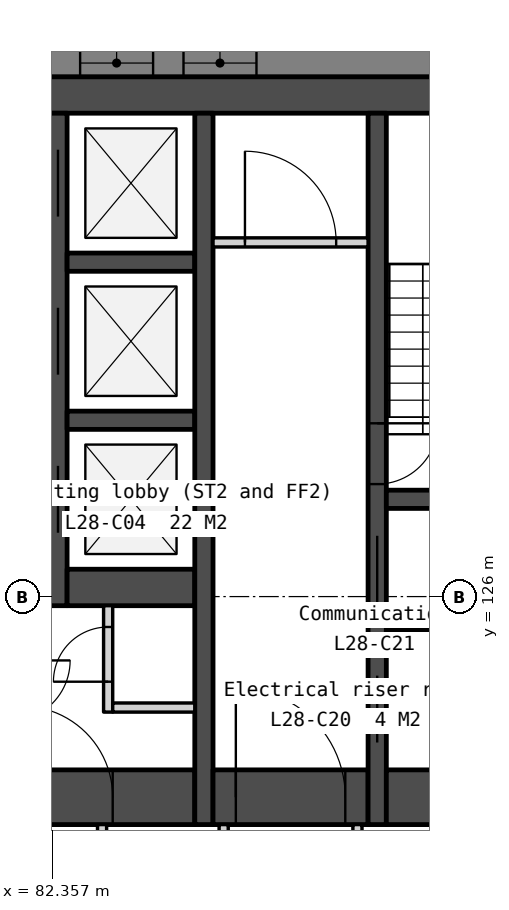
"""IFC4 building model, lengths in metres.
Left out: names, types, materials, properties, quantities, classifications, styles, units other than length and angle.
Written with IfcOpenShell. Run it as: python <this file> out.ifc"""

import sys

from ifc_helpers import new_model, si_unit, direction, frame, frame_2d, origin, place, context, subcontext, project, spatial, polyline, rectangle, outline, extrude, element, fill, save


model = new_model("IFC4")
c1 = context("Model", 3, precision=1e-05, world=origin(), true_north=direction((0.0, 1.0)))
c2 = subcontext(c1, "Body", "Model", "MODEL_VIEW")
j1 = project(units=[si_unit("LENGTHUNIT", "METRE"), si_unit("PLANEANGLEUNIT", "RADIAN")], contexts=[c1])
p1 = place(None, origin())
s1 = spatial("IfcSite", under=j1, at=p1, CompositionType="ELEMENT")
p2 = place(p1, origin())
s2 = spatial("IfcBuilding", under=s1, at=p2, CompositionType="ELEMENT")
p3 = place(p2, frame((0.0, 0.0, 113.3)))
s3 = spatial("IfcBuildingStorey", under=s2, at=p3, CompositionType="ELEMENT", Elevation=113.3)
p4 = place(p3, frame((66.0, 134.25, 0.0), z_axis=(0.0, 0.0, 1.0), x_axis=(1.0, 0.0, 0.0)))
e1 = element("IfcWall", 1, at=p4, inside=s3, PredefinedType="SOLIDWALL", context=c2, shape_type="SweptSolid", body=[
    extrude(rectangle(XDim=28.0, YDim=0.6, at=frame_2d((14.0, 0.0))), origin(), (0.0, 0.0, 1.0), 3.35),
])
p5 = place(p3, frame((81.8, 122.7, 0.0), z_axis=(0.0, 0.0, 1.0), x_axis=(1.0, 0.0, 0.0)))
e2 = element("IfcWall", 2, at=p5, inside=s3, PredefinedType="SOLIDWALL", context=c2, shape_type="SweptSolid", body=[
    extrude(rectangle(XDim=2.9, YDim=0.9, at=frame_2d((1.45, 0.0))), origin(), (0.0, 0.0, 1.0), 3.35),
])
p6 = place(p5, frame((0.05, 0.0, 0.0)))
e3 = element("IfcOpeningElement", 3, at=p6, cuts=e2, PredefinedType="OPENING", context=c2, shape_type="SweptSolid", body=[
    extrude(rectangle(XDim=1.5, YDim=2.1, at=frame_2d((0.75, 1.05))), frame((0.0, 0.46, 0.0), z_axis=(0.0, -1.0, 0.0), x_axis=(1.0, 0.0, 0.0)), (0.0, 0.0, 1.0), 0.92),
])
p7 = place(p3, frame((82.45, 133.95, 0.0), z_axis=(0.0, 0.0, 1.0), x_axis=(0.0, -1.0, 0.0)))
e4 = element("IfcWall", 4, at=p7, inside=s3, PredefinedType="SOLIDWALL", context=c2, shape_type="SweptSolid", body=[
    extrude(rectangle(XDim=8.1, YDim=0.3, at=frame_2d((4.05, 0.0))), origin(), (0.0, 0.0, 1.0), 3.35),
])
p8 = place(p7, frame((0.6, 0.0, 0.0)))
e5 = element("IfcOpeningElement", 5, at=p8, cuts=e4, PredefinedType="OPENING", context=c2, shape_type="SweptSolid", body=[
    extrude(rectangle(XDim=1.1, YDim=2.1, at=frame_2d((0.55, 1.05))), frame((0.0, 0.16, 0.0), z_axis=(0.0, -1.0, 0.0), x_axis=(1.0, 0.0, 0.0)), (0.0, 0.0, 1.0), 0.32),
])
p9 = place(p7, frame((3.2, 0.0, 0.0)))
e6 = element("IfcOpeningElement", 6, at=p9, cuts=e4, PredefinedType="OPENING", context=c2, shape_type="SweptSolid", body=[
    extrude(rectangle(XDim=1.1, YDim=2.1, at=frame_2d((0.55, 1.05))), frame((0.0, 0.16, 0.0), z_axis=(0.0, -1.0, 0.0), x_axis=(1.0, 0.0, 0.0)), (0.0, 0.0, 1.0), 0.32),
])
p10 = place(p7, frame((5.8, 0.0, 0.0)))
e7 = element("IfcOpeningElement", 7, at=p10, cuts=e4, PredefinedType="OPENING", context=c2, shape_type="SweptSolid", body=[
    extrude(rectangle(XDim=1.1, YDim=2.1, at=frame_2d((0.55, 1.05))), frame((0.0, 0.16, 0.0), z_axis=(0.0, -1.0, 0.0), x_axis=(1.0, 0.0, 0.0)), (0.0, 0.0, 1.0), 0.32),
])
for number, where, z_axis, x_axis in (
    (8, (82.6, 131.5, 0.0), (0.0, 0.0, 1.0), (1.0, 0.0, 0.0)),
    (9, (82.6, 128.9, 0.0), (0.0, 0.0, 1.0), (1.0, 0.0, 0.0)),
):
    element("IfcWall", number, at=place(p3, frame(where, z_axis=z_axis, x_axis=x_axis)), inside=s3, PredefinedType="SOLIDWALL", context=c2, shape_type="SweptSolid", body=[
        extrude(rectangle(XDim=2.1, YDim=0.3, at=frame_2d((1.05, 0.0))), origin(), (0.0, 0.0, 1.0), 3.35),
    ])
p11 = place(p3, frame((82.6, 126.15, 0.0), z_axis=(0.0, 0.0, 1.0), x_axis=(1.0, 0.0, 0.0)))
e10 = element("IfcWall", 10, at=p11, inside=s3, PredefinedType="SOLIDWALL", context=c2, shape_type="SweptSolid", body=[
    extrude(rectangle(XDim=2.1, YDim=0.6, at=frame_2d((1.05, 0.0))), origin(), (0.0, 0.0, 1.0), 3.35),
])
p12 = place(p3, frame((83.175, 122.25, 0.0), z_axis=(0.0, 0.0, 1.0), x_axis=(0.0, -1.0, 0.0)))
e11 = element("IfcWall", 11, at=p12, inside=s3, PredefinedType="PARTITIONING", context=c2, shape_type="SweptSolid", body=[
    extrude(rectangle(XDim=2.1, YDim=0.15, at=frame_2d((1.05, 0.0))), origin(), (0.0, 0.0, 1.0), 3.35),
])
p13 = place(p3, frame((83.275, 125.85, 0.0), z_axis=(0.0, 0.0, 1.0), x_axis=(0.0, -1.0, 0.0)))
e12 = element("IfcWall", 12, at=p13, inside=s3, PredefinedType="PARTITIONING", context=c2, shape_type="SweptSolid", body=[
    extrude(rectangle(XDim=1.75, YDim=0.15, at=frame_2d((0.875, 0.0))), origin(), (0.0, 0.0, 1.0), 3.35),
])
p14 = place(p13, frame((0.35, 0.0, 0.0)))
e13 = element("IfcOpeningElement", 13, at=p14, cuts=e12, PredefinedType="OPENING", context=c2, shape_type="SweptSolid", body=[
    extrude(rectangle(XDim=0.9, YDim=2.1, at=frame_2d((0.45, 1.05))), frame((0.0, 0.085, 0.0), z_axis=(0.0, -1.0, 0.0), x_axis=(1.0, 0.0, 0.0)), (0.0, 0.0, 1.0), 0.17),
])
p15 = place(p3, frame((83.35, 124.175, 0.0), z_axis=(0.0, 0.0, 1.0), x_axis=(1.0, 0.0, 0.0)))
e14 = element("IfcWall", 14, at=p15, inside=s3, PredefinedType="PARTITIONING", context=c2, shape_type="SweptSolid", body=[
    extrude(rectangle(XDim=1.35, YDim=0.15, at=frame_2d((0.675, 0.0))), origin(), (0.0, 0.0, 1.0), 3.35),
])
p16 = place(p3, frame((84.85, 133.95, 0.0), z_axis=(0.0, 0.0, 1.0), x_axis=(0.0, -1.0, 0.0)))
e15 = element("IfcWall", 15, at=p16, inside=s3, PredefinedType="SOLIDWALL", context=c2, shape_type="SweptSolid", body=[
    extrude(rectangle(XDim=11.7, YDim=0.3, at=frame_2d((5.85, 0.0))), origin(), (0.0, 0.0, 1.0), 3.35),
])
p17 = place(p3, frame((85.0, 131.825, 0.0), z_axis=(0.0, 0.0, 1.0), x_axis=(1.0, 0.0, 0.0)))
e16 = element("IfcWall", 16, at=p17, inside=s3, PredefinedType="PARTITIONING", context=c2, shape_type="SweptSolid", body=[
    extrude(rectangle(XDim=2.55, YDim=0.15, at=frame_2d((1.275, 0.0))), origin(), (0.0, 0.0, 1.0), 3.35),
])
p18 = place(p17, frame((0.525, 0.0, 0.0)))
e17 = element("IfcOpeningElement", 17, at=p18, cuts=e16, PredefinedType="OPENING", context=c2, shape_type="SweptSolid", body=[
    extrude(rectangle(XDim=1.5, YDim=2.1, at=frame_2d((0.75, 1.05))), frame((0.0, 0.085, 0.0), z_axis=(0.0, -1.0, 0.0), x_axis=(1.0, 0.0, 0.0)), (0.0, 0.0, 1.0), 0.17),
])
p19 = place(p3, frame((85.0, 122.7, 0.0), z_axis=(0.0, 0.0, 1.0), x_axis=(1.0, 0.0, 0.0)))
e18 = element("IfcWall", 18, at=p19, inside=s3, PredefinedType="SOLIDWALL", context=c2, shape_type="SweptSolid", body=[
    extrude(rectangle(XDim=2.55, YDim=0.9, at=frame_2d((1.275, 0.0))), origin(), (0.0, 0.0, 1.0), 3.35),
])
p20 = place(p19, frame((0.375, 0.0, 0.0)))
e19 = element("IfcOpeningElement", 19, at=p20, cuts=e18, PredefinedType="OPENING", context=c2, shape_type="SweptSolid", body=[
    extrude(rectangle(XDim=1.8, YDim=2.1, at=frame_2d((0.9, 1.05))), frame((0.0, 0.46, 0.0), z_axis=(0.0, -1.0, 0.0), x_axis=(1.0, 0.0, 0.0)), (0.0, 0.0, 1.0), 0.92),
])
p21 = place(p3, frame((85.175, 122.25, 0.0), z_axis=(0.0, 0.0, 1.0), x_axis=(0.0, -1.0, 0.0)))
e20 = element("IfcWall", 20, at=p21, inside=s3, PredefinedType="PARTITIONING", context=c2, shape_type="SweptSolid", body=[
    extrude(rectangle(XDim=2.1, YDim=0.15, at=frame_2d((1.05, 0.0))), origin(), (0.0, 0.0, 1.0), 3.35),
])
p22 = place(p21, frame((0.55, 0.0, 0.0)))
e21 = element("IfcOpeningElement", 21, at=p22, cuts=e20, PredefinedType="OPENING", context=c2, shape_type="SweptSolid", body=[
    extrude(rectangle(XDim=1.0, YDim=2.1, at=frame_2d((0.5, 1.05))), frame((0.0, 0.085, 0.0), z_axis=(0.0, -1.0, 0.0), x_axis=(1.0, 0.0, 0.0)), (0.0, 0.0, 1.0), 0.17),
])
p23 = place(p3, frame((87.375, 122.25, 0.0), z_axis=(0.0, 0.0, 1.0), x_axis=(0.0, -1.0, 0.0)))
e22 = element("IfcWall", 22, at=p23, inside=s3, PredefinedType="PARTITIONING", context=c2, shape_type="SweptSolid", body=[
    extrude(rectangle(XDim=2.1, YDim=0.15, at=frame_2d((1.05, 0.0))), origin(), (0.0, 0.0, 1.0), 3.35),
])
p24 = place(p3, frame((87.7, 133.95, 0.0), z_axis=(0.0, 0.0, 1.0), x_axis=(0.0, -1.0, 0.0)))
e23 = element("IfcWall", 23, at=p24, inside=s3, PredefinedType="SOLIDWALL", context=c2, shape_type="SweptSolid", body=[
    extrude(rectangle(XDim=11.7, YDim=0.3, at=frame_2d((5.85, 0.0))), origin(), (0.0, 0.0, 1.0), 3.35),
])
p25 = place(p24, frame((6.95, 0.0, 0.0)))
e24 = element("IfcOpeningElement", 24, at=p25, cuts=e23, PredefinedType="OPENING", context=c2, shape_type="SweptSolid", body=[
    extrude(rectangle(XDim=1.1, YDim=2.1, at=frame_2d((0.55, 1.05))), frame((0.0, 0.16, 0.0), z_axis=(0.0, -1.0, 0.0), x_axis=(1.0, 0.0, 0.0)), (0.0, 0.0, 1.0), 0.32),
])
p26 = place(p24, frame((5.1, 0.0, 0.0)))
e25 = element("IfcOpeningElement", 25, at=p26, cuts=e23, PredefinedType="OPENING", context=c2, shape_type="SweptSolid", body=[
    extrude(rectangle(XDim=1.0, YDim=2.1, at=frame_2d((0.5, 1.05))), frame((0.0, 0.16, 0.0), z_axis=(0.0, -1.0, 0.0), x_axis=(1.0, 0.0, 0.0)), (0.0, 0.0, 1.0), 0.32),
])
p27 = place(p24, frame((9.25, 0.0, 0.0)))
e26 = element("IfcOpeningElement", 26, at=p27, cuts=e23, PredefinedType="OPENING", context=c2, shape_type="SweptSolid", body=[
    extrude(rectangle(XDim=1.1, YDim=2.1, at=frame_2d((0.55, 1.05))), frame((0.0, 0.16, 0.0), z_axis=(0.0, -1.0, 0.0), x_axis=(1.0, 0.0, 0.0)), (0.0, 0.0, 1.0), 0.32),
])
for number, where, z_axis, x_axis in (
    (27, (87.85, 127.6, 0.0), (0.0, 0.0, 1.0), (1.0, 0.0, 0.0)),
    (28, (87.85, 125.3, 0.0), (0.0, 0.0, 1.0), (1.0, 0.0, 0.0)),
):
    element("IfcWall", number, at=place(p3, frame(where, z_axis=z_axis, x_axis=x_axis)), inside=s3, PredefinedType="SOLIDWALL", context=c2, shape_type="SweptSolid", body=[
        extrude(rectangle(XDim=2.55, YDim=0.3, at=frame_2d((1.275, 0.0))), origin(), (0.0, 0.0, 1.0), 3.35),
    ])
p28 = place(p3, frame((87.85, 122.7, 0.0), z_axis=(0.0, 0.0, 1.0), x_axis=(1.0, 0.0, 0.0)))
e29 = element("IfcWall", 29, at=p28, inside=s3, PredefinedType="SOLIDWALL", context=c2, shape_type="SweptSolid", body=[
    extrude(rectangle(XDim=2.55, YDim=0.9, at=frame_2d((1.275, 0.0))), origin(), (0.0, 0.0, 1.0), 3.35),
])
p29 = place(p3, frame((101.322, 134.775, -0.15), z_axis=(0.0, 0.0, 1.0), x_axis=(-1.0, 0.0, 0.0)))
e30 = element("IfcWall", 30, at=p29, inside=s3, PredefinedType="SOLIDWALL", context=c2, shape_type="SweptSolid", body=[
    extrude(outline(polyline([(42.643, 0.0), (42.643, 3.5), (0.0, 3.5), (0.0, 0.0), (42.643, 0.0)])), frame((0.0, 0.225, 0.0), z_axis=(0.0, -1.0, 0.0), x_axis=(1.0, 0.0, 0.0)), (0.0, 0.0, 1.0), 0.45),
])
p30 = place(p29, frame((7.079, 0.0, 1.05)))
e31 = element("IfcOpeningElement", 31, at=p30, cuts=e30, PredefinedType="OPENING", context=c2, shape_type="SweptSolid", body=[
    extrude(rectangle(XDim=1.2, YDim=1.5, at=frame_2d((0.6, 0.75))), frame((0.0, 0.235, 0.0), z_axis=(0.0, -1.0, 0.0), x_axis=(1.0, 0.0, 0.0)), (0.0, 0.0, 1.0), 0.47),
])
p31 = place(p29, frame((8.779, 0.0, 1.05)))
e32 = element("IfcOpeningElement", 32, at=p31, cuts=e30, PredefinedType="OPENING", context=c2, shape_type="SweptSolid", body=[
    extrude(rectangle(XDim=1.2, YDim=1.5, at=frame_2d((0.6, 0.75))), frame((0.0, 0.235, 0.0), z_axis=(0.0, -1.0, 0.0), x_axis=(1.0, 0.0, 0.0)), (0.0, 0.0, 1.0), 0.47),
])
p32 = place(p29, frame((15.607, 0.0, 1.05)))
e33 = element("IfcOpeningElement", 33, at=p32, cuts=e30, PredefinedType="OPENING", context=c2, shape_type="SweptSolid", body=[
    extrude(rectangle(XDim=1.2, YDim=1.5, at=frame_2d((0.6, 0.75))), frame((0.0, 0.235, 0.0), z_axis=(0.0, -1.0, 0.0), x_axis=(1.0, 0.0, 0.0)), (0.0, 0.0, 1.0), 0.47),
])
p33 = place(p29, frame((17.307, 0.0, 1.05)))
e34 = element("IfcOpeningElement", 34, at=p33, cuts=e30, PredefinedType="OPENING", context=c2, shape_type="SweptSolid", body=[
    extrude(rectangle(XDim=1.2, YDim=1.5, at=frame_2d((0.6, 0.75))), frame((0.0, 0.235, 0.0), z_axis=(0.0, -1.0, 0.0), x_axis=(1.0, 0.0, 0.0)), (0.0, 0.0, 1.0), 0.47),
])
p34 = place(p29, frame((24.136, 0.0, 1.05)))
e35 = element("IfcOpeningElement", 35, at=p34, cuts=e30, PredefinedType="OPENING", context=c2, shape_type="SweptSolid", body=[
    extrude(rectangle(XDim=1.2, YDim=1.5, at=frame_2d((0.6, 0.75))), frame((0.0, 0.235, 0.0), z_axis=(0.0, -1.0, 0.0), x_axis=(1.0, 0.0, 0.0)), (0.0, 0.0, 1.0), 0.47),
])
p35 = place(p29, frame((25.836, 0.0, 1.05)))
e36 = element("IfcOpeningElement", 36, at=p35, cuts=e30, PredefinedType="OPENING", context=c2, shape_type="SweptSolid", body=[
    extrude(rectangle(XDim=1.2, YDim=1.5, at=frame_2d((0.6, 0.75))), frame((0.0, 0.235, 0.0), z_axis=(0.0, -1.0, 0.0), x_axis=(1.0, 0.0, 0.0)), (0.0, 0.0, 1.0), 0.47),
])
p36 = place(p29, frame((32.665, 0.0, 1.05)))
e37 = element("IfcOpeningElement", 37, at=p36, cuts=e30, PredefinedType="OPENING", context=c2, shape_type="SweptSolid", body=[
    extrude(rectangle(XDim=1.2, YDim=1.5, at=frame_2d((0.6, 0.75))), frame((0.0, 0.235, 0.0), z_axis=(0.0, -1.0, 0.0), x_axis=(1.0, 0.0, 0.0)), (0.0, 0.0, 1.0), 0.47),
])
p37 = place(p29, frame((34.365, 0.0, 1.05)))
e38 = element("IfcOpeningElement", 38, at=p37, cuts=e30, PredefinedType="OPENING", context=c2, shape_type="SweptSolid", body=[
    extrude(rectangle(XDim=1.2, YDim=1.5, at=frame_2d((0.6, 0.75))), frame((0.0, 0.235, 0.0), z_axis=(0.0, -1.0, 0.0), x_axis=(1.0, 0.0, 0.0)), (0.0, 0.0, 1.0), 0.47),
])
p38 = place(p8, origin())
e39 = element("IfcDoor", 39, at=p38, inside=s3, OperationType="SLIDING_TO_LEFT", PredefinedType="DOOR", context=c2, shape_type="SweptSolid", body=[
    extrude(rectangle(XDim=1.1, YDim=2.1, at=frame_2d((0.55, 1.05))), frame((0.0, 0.025, 0.0), z_axis=(0.0, -1.0, 0.0), x_axis=(1.0, 0.0, 0.0)), (0.0, 0.0, 1.0), 0.05),
])
fill(e5, e39)
p39 = place(p9, origin())
e40 = element("IfcDoor", 40, at=p39, inside=s3, OperationType="SLIDING_TO_LEFT", PredefinedType="DOOR", context=c2, shape_type="SweptSolid", body=[
    extrude(rectangle(XDim=1.1, YDim=2.1, at=frame_2d((0.55, 1.05))), frame((0.0, 0.025, 0.0), z_axis=(0.0, -1.0, 0.0), x_axis=(1.0, 0.0, 0.0)), (0.0, 0.0, 1.0), 0.05),
])
fill(e6, e40)
p40 = place(p10, origin())
e41 = element("IfcDoor", 41, at=p40, inside=s3, OperationType="SLIDING_TO_LEFT", PredefinedType="DOOR", context=c2, shape_type="SweptSolid", body=[
    extrude(rectangle(XDim=1.1, YDim=2.1, at=frame_2d((0.55, 1.05))), frame((0.0, 0.025, 0.0), z_axis=(0.0, -1.0, 0.0), x_axis=(1.0, 0.0, 0.0)), (0.0, 0.0, 1.0), 0.05),
])
fill(e7, e41)
p41 = place(p25, origin())
e42 = element("IfcDoor", 42, at=p41, inside=s3, OperationType="SLIDING_TO_LEFT", PredefinedType="DOOR", context=c2, shape_type="SweptSolid", body=[
    extrude(rectangle(XDim=1.1, YDim=2.1, at=frame_2d((0.55, 1.05))), frame((0.0, 0.025, 0.0), z_axis=(0.0, -1.0, 0.0), x_axis=(1.0, 0.0, 0.0)), (0.0, 0.0, 1.0), 0.05),
])
fill(e24, e42)
p42 = place(p20, origin())
e43 = element("IfcDoor", 43, at=p42, inside=s3, OperationType="DOUBLE_DOOR_DOUBLE_SWING", PredefinedType="DOOR", context=c2, shape_type="SweptSolid", body=[
    extrude(rectangle(XDim=1.8, YDim=2.1, at=frame_2d((0.9, 1.05))), frame((0.0, 0.025, 0.0), z_axis=(0.0, -1.0, 0.0), x_axis=(1.0, 0.0, 0.0)), (0.0, 0.0, 1.0), 0.05),
])
fill(e19, e43)
p43 = place(p6, origin())
e44 = element("IfcDoor", 44, at=p43, inside=s3, OperationType="DOUBLE_DOOR_DOUBLE_SWING", PredefinedType="DOOR", context=c2, shape_type="SweptSolid", body=[
    extrude(rectangle(XDim=1.5, YDim=2.1, at=frame_2d((0.75, 1.05))), frame((0.0, 0.025, 0.0), z_axis=(0.0, -1.0, 0.0), x_axis=(1.0, 0.0, 0.0)), (0.0, 0.0, 1.0), 0.05),
])
fill(e3, e44)
p44 = place(p14, origin())
e45 = element("IfcDoor", 45, at=p44, inside=s3, OperationType="SINGLE_SWING_RIGHT", PredefinedType="DOOR", context=c2, shape_type="SweptSolid", body=[
    extrude(rectangle(XDim=0.9, YDim=2.1, at=frame_2d((0.45, 1.05))), frame((0.0, 0.025, 0.0), z_axis=(0.0, -1.0, 0.0), x_axis=(1.0, 0.0, 0.0)), (0.0, 0.0, 1.0), 0.05),
])
fill(e13, e45)
p45 = place(p18, origin())
e46 = element("IfcDoor", 46, at=p45, inside=s3, OperationType="DOUBLE_DOOR_DOUBLE_SWING", PredefinedType="DOOR", context=c2, shape_type="SweptSolid", body=[
    extrude(rectangle(XDim=1.5, YDim=2.1, at=frame_2d((0.75, 1.05))), frame((0.0, 0.025, 0.0), z_axis=(0.0, -1.0, 0.0), x_axis=(1.0, 0.0, 0.0)), (0.0, 0.0, 1.0), 0.05),
])
fill(e17, e46)
p46 = place(p26, origin())
e47 = element("IfcDoor", 47, at=p46, inside=s3, OperationType="SINGLE_SWING_LEFT", PredefinedType="DOOR", context=c2, shape_type="SweptSolid", body=[
    extrude(rectangle(XDim=1.0, YDim=2.1, at=frame_2d((0.5, 1.05))), frame((0.0, 0.025, 0.0), z_axis=(0.0, -1.0, 0.0), x_axis=(1.0, 0.0, 0.0)), (0.0, 0.0, 1.0), 0.05),
])
fill(e25, e47)
p47 = place(p27, origin())
e48 = element("IfcDoor", 48, at=p47, inside=s3, OperationType="SLIDING_TO_LEFT", PredefinedType="DOOR", context=c2, shape_type="SweptSolid", body=[
    extrude(rectangle(XDim=1.1, YDim=2.1, at=frame_2d((0.55, 1.05))), frame((0.0, 0.025, 0.0), z_axis=(0.0, -1.0, 0.0), x_axis=(1.0, 0.0, 0.0)), (0.0, 0.0, 1.0), 0.05),
])
fill(e26, e48)
p48 = place(p32, origin())
e49 = element("IfcWindow", 49, at=p48, inside=s3, PartitioningType="SINGLE_PANEL", PredefinedType="WINDOW", context=c2, shape_type="SweptSolid", body=[
    extrude(rectangle(XDim=1.2, YDim=1.5, at=frame_2d((0.6, 0.75))), frame((0.0, 0.03, 0.0), z_axis=(0.0, -1.0, 0.0), x_axis=(1.0, 0.0, 0.0)), (0.0, 0.0, 1.0), 0.06),
])
fill(e33, e49)
p49 = place(p33, origin())
e50 = element("IfcWindow", 50, at=p49, inside=s3, PartitioningType="SINGLE_PANEL", PredefinedType="WINDOW", context=c2, shape_type="SweptSolid", body=[
    extrude(rectangle(XDim=1.2, YDim=1.5, at=frame_2d((0.6, 0.75))), frame((0.0, 0.03, 0.0), z_axis=(0.0, -1.0, 0.0), x_axis=(1.0, 0.0, 0.0)), (0.0, 0.0, 1.0), 0.06),
])
fill(e34, e50)
save(model, sys.argv[1])
